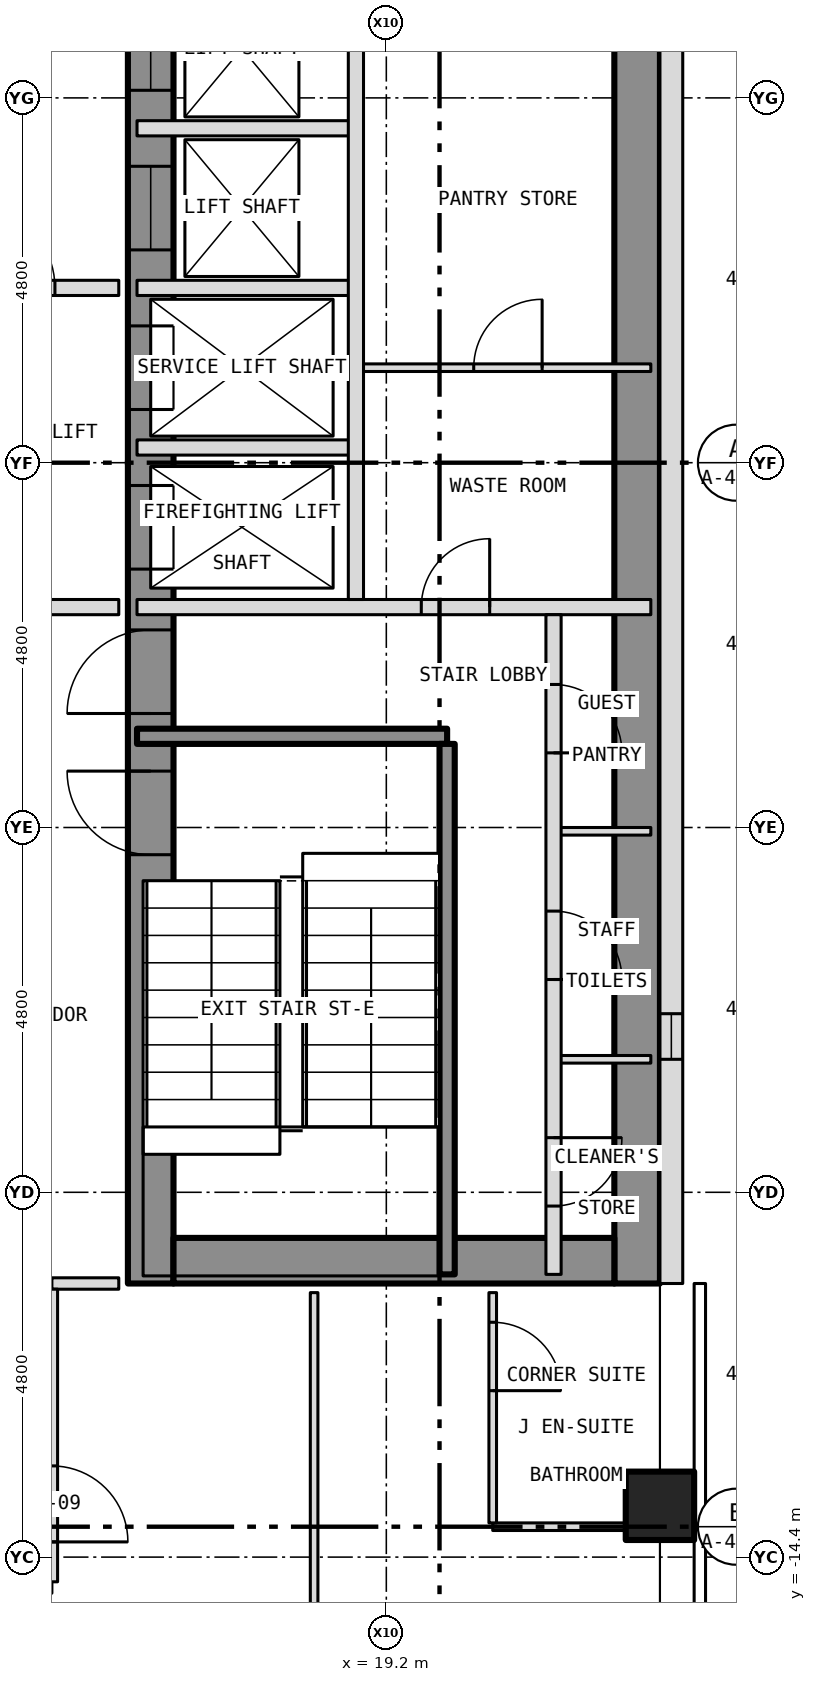
"""IFC4 building model, lengths in metres.
Left out: names, types, materials, properties, quantities, classifications, styles, units other than length and angle.
Written with IfcOpenShell. Run it as: python <this file> out.ifc"""

import sys

from ifc_helpers import new_model, si_unit, direction, frame, frame_2d, origin, origin_2d, place, context, subcontext, project, spatial, rectangle, hollow_rectangle, extrude, element, fill, save


model = new_model("IFC4")
c1 = context("Model", 3, precision=1e-05, world=origin(), true_north=direction((0.0, 1.0)))
c2 = subcontext(c1, "Body", "Model", "MODEL_VIEW")
j1 = project(units=[si_unit("LENGTHUNIT", "METRE"), si_unit("PLANEANGLEUNIT", "RADIAN")], contexts=[c1])
p1 = place(None, origin())
s1 = spatial("IfcSite", under=j1, at=p1, CompositionType="ELEMENT")
p2 = place(p1, origin())
s2 = spatial("IfcBuilding", under=s1, at=p2, CompositionType="ELEMENT")
p3 = place(p2, frame((0.0, 0.0, 110.0)))
s3 = spatial("IfcBuildingStorey", under=s2, at=p3, CompositionType="ELEMENT", Elevation=110.0)
p4 = place(p3, frame((22.8, -13.725, -0.15), z_axis=(0.0, 0.0, 1.0), x_axis=(1.0, 0.0, 0.0)))
e1 = element("IfcColumn", 1, at=p4, inside=s3, PredefinedType="COLUMN", context=c2, shape_type="SweptSolid", body=[
    extrude(hollow_rectangle(XDim=0.9, YDim=0.9, WallThickness=0.05, at=origin_2d()), origin(), (0.0, 0.0, 1.0), 3.5),
])
p5 = place(p3, frame((16.1, -10.8, 0.0), z_axis=(0.0, 0.0, 1.0), x_axis=(0.0, 1.0, 0.0)))
e2 = element("IfcWall", 2, at=p5, inside=s3, PredefinedType="SHEAR", context=c2, shape_type="SweptSolid", body=[
    extrude(rectangle(XDim=21.6, YDim=0.6, at=frame_2d((10.8, 0.0))), origin(), (0.0, 0.0, 1.0), 3.25),
])
p6 = place(p5, frame((9.4, 0.0, 0.0)))
e3 = element("IfcOpeningElement", 3, at=p6, cuts=e2, PredefinedType="OPENING", context=c2, shape_type="SweptSolid", body=[
    extrude(rectangle(XDim=1.1, YDim=2.1, at=frame_2d((0.55, 1.05))), frame((0.0, 0.312, 0.0), z_axis=(0.0, -1.0, 0.0), x_axis=(1.0, 0.0, 0.0)), (0.0, 0.0, 1.0), 0.624),
])
p7 = place(p5, frame((11.5, 0.0, 0.0)))
e4 = element("IfcOpeningElement", 4, at=p7, cuts=e2, PredefinedType="OPENING", context=c2, shape_type="SweptSolid", body=[
    extrude(rectangle(XDim=1.1, YDim=2.1, at=frame_2d((0.55, 1.05))), frame((0.0, 0.312, 0.0), z_axis=(0.0, -1.0, 0.0), x_axis=(1.0, 0.0, 0.0)), (0.0, 0.0, 1.0), 0.624),
])
p8 = place(p5, frame((13.6, 0.0, 0.0)))
e5 = element("IfcOpeningElement", 5, at=p8, cuts=e2, PredefinedType="OPENING", context=c2, shape_type="SweptSolid", body=[
    extrude(rectangle(XDim=1.1, YDim=2.1, at=frame_2d((0.55, 1.05))), frame((0.0, 0.312, 0.0), z_axis=(0.0, -1.0, 0.0), x_axis=(1.0, 0.0, 0.0)), (0.0, 0.0, 1.0), 0.624),
])
p9 = place(p5, frame((15.7, 0.0, 0.0)))
e6 = element("IfcOpeningElement", 6, at=p9, cuts=e2, PredefinedType="OPENING", context=c2, shape_type="SweptSolid", body=[
    extrude(rectangle(XDim=1.1, YDim=2.1, at=frame_2d((0.55, 1.05))), frame((0.0, 0.312, 0.0), z_axis=(0.0, -1.0, 0.0), x_axis=(1.0, 0.0, 0.0)), (0.0, 0.0, 1.0), 0.624),
])
p10 = place(p5, frame((17.8, 0.0, 0.0)))
e7 = element("IfcOpeningElement", 7, at=p10, cuts=e2, PredefinedType="OPENING", context=c2, shape_type="SweptSolid", body=[
    extrude(rectangle(XDim=1.1, YDim=2.1, at=frame_2d((0.55, 1.05))), frame((0.0, 0.312, 0.0), z_axis=(0.0, -1.0, 0.0), x_axis=(1.0, 0.0, 0.0)), (0.0, 0.0, 1.0), 0.624),
])
p11 = place(p5, frame((5.642, 0.0, 0.0)))
e8 = element("IfcOpeningElement", 8, at=p11, cuts=e2, PredefinedType="OPENING", context=c2, shape_type="SweptSolid", body=[
    extrude(rectangle(XDim=1.1, YDim=2.1, at=frame_2d((0.55, 1.05))), frame((0.0, 0.312, 0.0), z_axis=(0.0, -1.0, 0.0), x_axis=(1.0, 0.0, 0.0)), (0.0, 0.0, 1.0), 0.624),
])
p12 = place(p5, frame((7.5, 0.0, 0.0)))
e9 = element("IfcOpeningElement", 9, at=p12, cuts=e2, PredefinedType="OPENING", context=c2, shape_type="SweptSolid", body=[
    extrude(rectangle(XDim=1.1, YDim=2.1, at=frame_2d((0.55, 1.05))), frame((0.0, 0.312, 0.0), z_axis=(0.0, -1.0, 0.0), x_axis=(1.0, 0.0, 0.0)), (0.0, 0.0, 1.0), 0.624),
])
p13 = place(p3, frame((22.5, -10.8, 0.0), z_axis=(0.0, 0.0, 1.0), x_axis=(0.0, 1.0, 0.0)))
e10 = element("IfcWall", 10, at=p13, inside=s3, PredefinedType="SHEAR", context=c2, shape_type="SweptSolid", body=[
    extrude(rectangle(XDim=21.6, YDim=0.6, at=frame_2d((10.8, 0.0))), origin(), (0.0, 0.0, 1.0), 3.25),
])
p14 = place(p3, frame((16.4, -10.5, 0.0), z_axis=(0.0, 0.0, 1.0), x_axis=(1.0, 0.0, 0.0)))
e11 = element("IfcWall", 11, at=p14, inside=s3, PredefinedType="SHEAR", context=c2, shape_type="SweptSolid", body=[
    extrude(rectangle(XDim=5.8, YDim=0.6, at=frame_2d((2.9, 0.0))), origin(), (0.0, 0.0, 1.0), 3.25),
])
p15 = place(p3, frame((22.95, -10.8, 0.0), z_axis=(0.0, 0.0, 1.0), x_axis=(0.0, 1.0, 0.0)))
e12 = element("IfcWall", 12, at=p15, inside=s3, PredefinedType="SOLIDWALL", context=c2, shape_type="SweptSolid", body=[
    extrude(rectangle(XDim=21.6, YDim=0.3, at=frame_2d((10.8, 0.0))), origin(), (0.0, 0.0, 1.0), 3.5),
])
p16 = place(p15, frame((2.95, 0.0, 1.0)))
e13 = element("IfcOpeningElement", 13, at=p16, cuts=e12, PredefinedType="OPENING", context=c2, shape_type="SweptSolid", body=[
    extrude(rectangle(XDim=0.6, YDim=1.5, at=frame_2d((0.3, 0.75))), frame((0.0, 0.162, 0.0), z_axis=(0.0, -1.0, 0.0), x_axis=(1.0, 0.0, 0.0)), (0.0, 0.0, 1.0), 0.324),
])
p17 = place(p3, frame((20.6, -14.0, 0.0), z_axis=(0.0, 0.0, 1.0), x_axis=(1.0, 0.0, 0.0)))
e14 = element("IfcWall", 14, at=p17, inside=s3, PredefinedType="PARTITIONING", context=c2, shape_type="SweptSolid", body=[
    extrude(rectangle(XDim=2.08, YDim=0.1, at=frame_2d((1.04, 0.0))), origin(), (0.0, 0.0, 1.0), 3.35),
])
p18 = place(p3, frame((14.8, -10.8, 0.0), z_axis=(0.0, 0.0, 1.0), x_axis=(1.0, 0.0, 0.0)))
e15 = element("IfcWall", 15, at=p18, inside=s3, PredefinedType="PARTITIONING", context=c2, shape_type="SweptSolid", body=[
    extrude(rectangle(XDim=0.88, YDim=0.15, at=frame_2d((0.44, 0.0))), origin(), (0.0, 0.0, 1.0), 3.35),
])
for number, where, z_axis, x_axis in (
    (16, (21.4, -7.85, 0.0), (0.0, 0.0, 1.0), (1.0, 0.0, 0.0)),
    (17, (21.4, -4.85, 0.0), (0.0, 0.0, 1.0), (1.0, 0.0, 0.0)),
):
    element("IfcWall", number, at=place(p3, frame(where, z_axis=z_axis, x_axis=x_axis)), inside=s3, PredefinedType="PARTITIONING", context=c2, shape_type="SweptSolid", body=[
        extrude(rectangle(XDim=1.28, YDim=0.1, at=frame_2d((0.64, 0.0))), origin(), (0.0, 0.0, 1.0), 3.25),
    ])
p19 = place(p3, frame((15.92, -3.6, 0.0), z_axis=(0.0, 0.0, 1.0), x_axis=(1.0, 0.0, 0.0)))
e18 = element("IfcWall", 18, at=p19, inside=s3, PredefinedType="SHEAR", context=c2, shape_type="SweptSolid", body=[
    extrude(rectangle(XDim=4.08, YDim=0.2, at=frame_2d((2.04, 0.0))), origin(), (0.0, 0.0, 1.0), 3.25),
])
p20 = place(p3, frame((12.4, -1.9, 0.0), z_axis=(0.0, 0.0, 1.0), x_axis=(1.0, 0.0, 0.0)))
e19 = element("IfcWall", 19, at=p20, inside=s3, PredefinedType="PARTITIONING", context=c2, shape_type="SweptSolid", body=[
    extrude(rectangle(XDim=3.28, YDim=0.2, at=frame_2d((1.64, 0.0))), origin(), (0.0, 0.0, 1.0), 3.35),
])
p21 = place(p20, frame((1.24, 0.0, 0.0)))
e20 = element("IfcOpeningElement", 20, at=p21, cuts=e19, PredefinedType="OPENING", context=c2, shape_type="SweptSolid", body=[
    extrude(rectangle(XDim=1.1, YDim=2.1, at=frame_2d((0.55, 1.05))), frame((0.0, 0.112, 0.0), z_axis=(0.0, -1.0, 0.0), x_axis=(1.0, 0.0, 0.0)), (0.0, 0.0, 1.0), 0.224),
])
p22 = place(p3, frame((15.92, -1.9, 0.0), z_axis=(0.0, 0.0, 1.0), x_axis=(1.0, 0.0, 0.0)))
e21 = element("IfcWall", 21, at=p22, inside=s3, PredefinedType="PARTITIONING", context=c2, shape_type="SweptSolid", body=[
    extrude(rectangle(XDim=6.76, YDim=0.2, at=frame_2d((3.38, 0.0))), origin(), (0.0, 0.0, 1.0), 3.25),
])
p23 = place(p22, frame((3.74, 0.0, 0.0)))
e22 = element("IfcOpeningElement", 22, at=p23, cuts=e21, PredefinedType="OPENING", context=c2, shape_type="SweptSolid", body=[
    extrude(rectangle(XDim=0.9, YDim=2.1, at=frame_2d((0.45, 1.05))), frame((0.0, 0.112, 0.0), z_axis=(0.0, -1.0, 0.0), x_axis=(1.0, 0.0, 0.0)), (0.0, 0.0, 1.0), 0.224),
])
p24 = place(p3, frame((15.92, 0.2, 0.0), z_axis=(0.0, 0.0, 1.0), x_axis=(1.0, 0.0, 0.0)))
e23 = element("IfcWall", 23, at=p24, inside=s3, PredefinedType="PARTITIONING", context=c2, shape_type="SweptSolid", body=[
    extrude(rectangle(XDim=2.88, YDim=0.2, at=frame_2d((1.44, 0.0))), origin(), (0.0, 0.0, 1.0), 3.25),
])
p25 = place(p3, frame((18.8, 1.25, 0.0), z_axis=(0.0, 0.0, 1.0), x_axis=(1.0, 0.0, 0.0)))
e24 = element("IfcWall", 24, at=p25, inside=s3, PredefinedType="PARTITIONING", context=c2, shape_type="SweptSolid", body=[
    extrude(rectangle(XDim=3.88, YDim=0.1, at=frame_2d((1.94, 0.0))), origin(), (0.0, 0.0, 1.0), 3.25),
])
p26 = place(p25, frame((1.55, 0.0, 0.0)))
e25 = element("IfcOpeningElement", 25, at=p26, cuts=e24, PredefinedType="OPENING", context=c2, shape_type="SweptSolid", body=[
    extrude(rectangle(XDim=0.9, YDim=2.1, at=frame_2d((0.45, 1.05))), frame((0.0, 0.062, 0.0), z_axis=(0.0, -1.0, 0.0), x_axis=(1.0, 0.0, 0.0)), (0.0, 0.0, 1.0), 0.124),
])
p27 = place(p3, frame((12.4, 2.3, 0.0), z_axis=(0.0, 0.0, 1.0), x_axis=(1.0, 0.0, 0.0)))
e26 = element("IfcWall", 26, at=p27, inside=s3, PredefinedType="PARTITIONING", context=c2, shape_type="SweptSolid", body=[
    extrude(rectangle(XDim=3.28, YDim=0.2, at=frame_2d((1.64, 0.0))), origin(), (0.0, 0.0, 1.0), 3.35),
])
p28 = place(p27, frame((1.34, 0.0, 0.0)))
e27 = element("IfcOpeningElement", 27, at=p28, cuts=e26, PredefinedType="OPENING", context=c2, shape_type="SweptSolid", body=[
    extrude(rectangle(XDim=1.1, YDim=2.1, at=frame_2d((0.55, 1.05))), frame((0.0, 0.112, 0.0), z_axis=(0.0, -1.0, 0.0), x_axis=(1.0, 0.0, 0.0)), (0.0, 0.0, 1.0), 0.224),
])
for number, where, z_axis, x_axis in (
    (28, (15.92, 2.3, 0.0), (0.0, 0.0, 1.0), (1.0, 0.0, 0.0)),
    (29, (15.92, 4.4, 0.0), (0.0, 0.0, 1.0), (1.0, 0.0, 0.0)),
):
    element("IfcWall", number, at=place(p3, frame(where, z_axis=z_axis, x_axis=x_axis)), inside=s3, PredefinedType="PARTITIONING", context=c2, shape_type="SweptSolid", body=[
        extrude(rectangle(XDim=2.88, YDim=0.2, at=frame_2d((1.44, 0.0))), origin(), (0.0, 0.0, 1.0), 3.25),
    ])
p29 = place(p3, frame((14.8, -14.725, 0.0), z_axis=(0.0, 0.0, 1.0), x_axis=(0.0, 1.0, 0.0)))
e30 = element("IfcWall", 30, at=p29, inside=s3, PredefinedType="PARTITIONING", context=c2, shape_type="SweptSolid", body=[
    extrude(rectangle(XDim=3.85, YDim=0.15, at=frame_2d((1.925, 0.0))), origin(), (0.0, 0.0, 1.0), 3.35),
])
p30 = place(p29, frame((0.525, 0.0, 0.0)))
e31 = element("IfcOpeningElement", 31, at=p30, cuts=e30, PredefinedType="OPENING", context=c2, shape_type="SweptSolid", body=[
    extrude(rectangle(XDim=1.0, YDim=2.1, at=frame_2d((0.5, 1.05))), frame((0.0, 0.087, 0.0), z_axis=(0.0, -1.0, 0.0), x_axis=(1.0, 0.0, 0.0)), (0.0, 0.0, 1.0), 0.174),
])
p31 = place(p3, frame((18.25, -18.191, 0.0), z_axis=(0.0, 0.0, 1.0), x_axis=(0.0, 1.0, 0.0)))
e32 = element("IfcWall", 32, at=p31, inside=s3, PredefinedType="PARTITIONING", context=c2, shape_type="SweptSolid", body=[
    extrude(rectangle(XDim=7.271, YDim=0.1, at=frame_2d((3.635, 0.0))), origin(), (0.0, 0.0, 1.0), 3.35),
])
p32 = place(p31, frame((0.941, 0.0, 0.0)))
e33 = element("IfcOpeningElement", 33, at=p32, cuts=e32, PredefinedType="OPENING", context=c2, shape_type="SweptSolid", body=[
    extrude(rectangle(XDim=0.9, YDim=2.1, at=frame_2d((0.45, 1.05))), frame((0.0, 0.062, 0.0), z_axis=(0.0, -1.0, 0.0), x_axis=(1.0, 0.0, 0.0)), (0.0, 0.0, 1.0), 0.124),
])
p33 = place(p3, frame((18.8, -1.8, 0.0), z_axis=(0.0, 0.0, 1.0), x_axis=(0.0, 1.0, 0.0)))
e34 = element("IfcWall", 34, at=p33, inside=s3, PredefinedType="PARTITIONING", context=c2, shape_type="SweptSolid", body=[
    extrude(rectangle(XDim=12.48, YDim=0.2, at=frame_2d((6.24, 0.0))), origin(), (0.0, 0.0, 1.0), 3.25),
])
p34 = place(p3, frame((20.0, -10.68, 0.0), z_axis=(0.0, 0.0, 1.0), x_axis=(0.0, 1.0, 0.0)))
e35 = element("IfcWall", 35, at=p34, inside=s3, PredefinedType="SHEAR", context=c2, shape_type="SweptSolid", body=[
    extrude(rectangle(XDim=6.98, YDim=0.2, at=frame_2d((3.49, 0.0))), origin(), (0.0, 0.0, 1.0), 3.25),
])
p35 = place(p3, frame((20.6, -13.95, 0.0), z_axis=(0.0, 0.0, 1.0), x_axis=(0.0, 1.0, 0.0)))
e36 = element("IfcWall", 36, at=p35, inside=s3, PredefinedType="PARTITIONING", context=c2, shape_type="SweptSolid", body=[
    extrude(rectangle(XDim=3.03, YDim=0.1, at=frame_2d((1.515, 0.0))), origin(), (0.0, 0.0, 1.0), 3.35),
])
p36 = place(p35, frame((1.74, 0.0, 0.0)))
e37 = element("IfcOpeningElement", 37, at=p36, cuts=e36, PredefinedType="OPENING", context=c2, shape_type="SweptSolid", body=[
    extrude(rectangle(XDim=0.9, YDim=2.1, at=frame_2d((0.45, 1.05))), frame((0.0, 0.062, 0.0), z_axis=(0.0, -1.0, 0.0), x_axis=(1.0, 0.0, 0.0)), (0.0, 0.0, 1.0), 0.124),
])
p37 = place(p3, frame((21.4, -10.68, 0.0), z_axis=(0.0, 0.0, 1.0), x_axis=(0.0, 1.0, 0.0)))
e38 = element("IfcWall", 38, at=p37, inside=s3, PredefinedType="PARTITIONING", context=c2, shape_type="SweptSolid", body=[
    extrude(rectangle(XDim=8.68, YDim=0.2, at=frame_2d((4.34, 0.0))), origin(), (0.0, 0.0, 1.0), 3.25),
])
p38 = place(p37, frame((0.899, 0.0, 0.0)))
e39 = element("IfcOpeningElement", 39, at=p38, cuts=e38, PredefinedType="OPENING", context=c2, shape_type="SweptSolid", body=[
    extrude(rectangle(XDim=0.9, YDim=2.1, at=frame_2d((0.45, 1.05))), frame((0.0, 0.112, 0.0), z_axis=(0.0, -1.0, 0.0), x_axis=(1.0, 0.0, 0.0)), (0.0, 0.0, 1.0), 0.224),
])
p39 = place(p37, frame((3.88, 0.0, 0.0)))
e40 = element("IfcOpeningElement", 40, at=p39, cuts=e38, PredefinedType="OPENING", context=c2, shape_type="SweptSolid", body=[
    extrude(rectangle(XDim=0.9, YDim=2.1, at=frame_2d((0.45, 1.05))), frame((0.0, 0.112, 0.0), z_axis=(0.0, -1.0, 0.0), x_axis=(1.0, 0.0, 0.0)), (0.0, 0.0, 1.0), 0.224),
])
p40 = place(p37, frame((6.862, 0.0, 0.0)))
e41 = element("IfcOpeningElement", 41, at=p40, cuts=e38, PredefinedType="OPENING", context=c2, shape_type="SweptSolid", body=[
    extrude(rectangle(XDim=0.9, YDim=2.1, at=frame_2d((0.45, 1.05))), frame((0.0, 0.112, 0.0), z_axis=(0.0, -1.0, 0.0), x_axis=(1.0, 0.0, 0.0)), (0.0, 0.0, 1.0), 0.224),
])
p41 = place(p16, origin())
e42 = element("IfcWindow", 42, at=p41, inside=s3, PartitioningType="SINGLE_PANEL", PredefinedType="WINDOW", context=c2, shape_type="SweptSolid", body=[
    extrude(rectangle(XDim=0.6, YDim=1.5, at=frame_2d((0.3, 0.75))), frame((0.0, -0.06, 0.0), z_axis=(0.0, -1.0, 0.0), x_axis=(1.0, 0.0, 0.0)), (0.0, 0.0, 1.0), 0.06),
])
fill(e13, e42)
p42 = place(p6, origin())
e43 = element("IfcDoor", 43, at=p42, inside=s3, OperationType="SLIDING_TO_LEFT", PredefinedType="DOOR", context=c2, shape_type="SweptSolid", body=[
    extrude(rectangle(XDim=1.1, YDim=2.1, at=frame_2d((0.55, 1.05))), frame((0.0, 0.025, 0.0), z_axis=(0.0, -1.0, 0.0), x_axis=(1.0, 0.0, 0.0)), (0.0, 0.0, 1.0), 0.05),
])
fill(e3, e43)
p43 = place(p7, origin())
e44 = element("IfcDoor", 44, at=p43, inside=s3, OperationType="SLIDING_TO_LEFT", PredefinedType="DOOR", context=c2, shape_type="SweptSolid", body=[
    extrude(rectangle(XDim=1.1, YDim=2.1, at=frame_2d((0.55, 1.05))), frame((0.0, 0.025, 0.0), z_axis=(0.0, -1.0, 0.0), x_axis=(1.0, 0.0, 0.0)), (0.0, 0.0, 1.0), 0.05),
])
fill(e4, e44)
p44 = place(p8, origin())
e45 = element("IfcDoor", 45, at=p44, inside=s3, OperationType="SLIDING_TO_LEFT", PredefinedType="DOOR", context=c2, shape_type="SweptSolid", body=[
    extrude(rectangle(XDim=1.1, YDim=2.1, at=frame_2d((0.55, 1.05))), frame((0.0, 0.025, 0.0), z_axis=(0.0, -1.0, 0.0), x_axis=(1.0, 0.0, 0.0)), (0.0, 0.0, 1.0), 0.05),
])
fill(e5, e45)
p45 = place(p9, origin())
e46 = element("IfcDoor", 46, at=p45, inside=s3, OperationType="SLIDING_TO_LEFT", PredefinedType="DOOR", context=c2, shape_type="SweptSolid", body=[
    extrude(rectangle(XDim=1.1, YDim=2.1, at=frame_2d((0.55, 1.05))), frame((0.0, 0.025, 0.0), z_axis=(0.0, -1.0, 0.0), x_axis=(1.0, 0.0, 0.0)), (0.0, 0.0, 1.0), 0.05),
])
fill(e6, e46)
p46 = place(p11, origin())
e47 = element("IfcDoor", 47, at=p46, inside=s3, OperationType="SINGLE_SWING_RIGHT", PredefinedType="DOOR", context=c2, shape_type="SweptSolid", body=[
    extrude(rectangle(XDim=1.1, YDim=2.1, at=frame_2d((0.55, 1.05))), frame((0.0, 0.025, 0.0), z_axis=(0.0, -1.0, 0.0), x_axis=(1.0, 0.0, 0.0)), (0.0, 0.0, 1.0), 0.05),
])
fill(e8, e47)
p47 = place(p12, origin())
e48 = element("IfcDoor", 48, at=p47, inside=s3, OperationType="SINGLE_SWING_LEFT", PredefinedType="DOOR", context=c2, shape_type="SweptSolid", body=[
    extrude(rectangle(XDim=1.1, YDim=2.1, at=frame_2d((0.55, 1.05))), frame((0.0, 0.025, 0.0), z_axis=(0.0, -1.0, 0.0), x_axis=(1.0, 0.0, 0.0)), (0.0, 0.0, 1.0), 0.05),
])
fill(e9, e48)
p48 = place(p38, origin())
e49 = element("IfcDoor", 49, at=p48, inside=s3, OperationType="SINGLE_SWING_RIGHT", PredefinedType="DOOR", context=c2, shape_type="SweptSolid", body=[
    extrude(rectangle(XDim=0.9, YDim=2.1, at=frame_2d((0.45, 1.05))), frame((0.0, 0.025, 0.0), z_axis=(0.0, -1.0, 0.0), x_axis=(1.0, 0.0, 0.0)), (0.0, 0.0, 1.0), 0.05),
])
fill(e39, e49)
p49 = place(p39, origin())
e50 = element("IfcDoor", 50, at=p49, inside=s3, OperationType="SINGLE_SWING_LEFT", PredefinedType="DOOR", context=c2, shape_type="SweptSolid", body=[
    extrude(rectangle(XDim=0.9, YDim=2.1, at=frame_2d((0.45, 1.05))), frame((0.0, 0.025, 0.0), z_axis=(0.0, -1.0, 0.0), x_axis=(1.0, 0.0, 0.0)), (0.0, 0.0, 1.0), 0.05),
])
fill(e40, e50)
p50 = place(p40, origin())
e51 = element("IfcDoor", 51, at=p50, inside=s3, OperationType="SINGLE_SWING_LEFT", PredefinedType="DOOR", context=c2, shape_type="SweptSolid", body=[
    extrude(rectangle(XDim=0.9, YDim=2.1, at=frame_2d((0.45, 1.05))), frame((0.0, 0.025, 0.0), z_axis=(0.0, -1.0, 0.0), x_axis=(1.0, 0.0, 0.0)), (0.0, 0.0, 1.0), 0.05),
])
fill(e41, e51)
p51 = place(p23, origin())
e52 = element("IfcDoor", 52, at=p51, inside=s3, OperationType="SINGLE_SWING_RIGHT", PredefinedType="DOOR", context=c2, shape_type="SweptSolid", body=[
    extrude(rectangle(XDim=0.9, YDim=2.1, at=frame_2d((0.45, 1.05))), frame((0.0, 0.025, 0.0), z_axis=(0.0, -1.0, 0.0), x_axis=(1.0, 0.0, 0.0)), (0.0, 0.0, 1.0), 0.05),
])
fill(e22, e52)
p52 = place(p26, origin())
e53 = element("IfcDoor", 53, at=p52, inside=s3, OperationType="SINGLE_SWING_RIGHT", PredefinedType="DOOR", context=c2, shape_type="SweptSolid", body=[
    extrude(rectangle(XDim=0.9, YDim=2.1, at=frame_2d((0.45, 1.05))), frame((0.0, 0.025, 0.0), z_axis=(0.0, -1.0, 0.0), x_axis=(1.0, 0.0, 0.0)), (0.0, 0.0, 1.0), 0.05),
])
fill(e25, e53)
p53 = place(p28, origin())
e54 = element("IfcDoor", 54, at=p53, inside=s3, OperationType="SINGLE_SWING_LEFT", PredefinedType="DOOR", context=c2, shape_type="SweptSolid", body=[
    extrude(rectangle(XDim=1.1, YDim=2.1, at=frame_2d((0.55, 1.05))), frame((0.0, 0.025, 0.0), z_axis=(0.0, -1.0, 0.0), x_axis=(1.0, 0.0, 0.0)), (0.0, 0.0, 1.0), 0.05),
])
fill(e27, e54)
p54 = place(p30, origin())
e55 = element("IfcDoor", 55, at=p54, inside=s3, OperationType="SINGLE_SWING_LEFT", PredefinedType="DOOR", context=c2, shape_type="SweptSolid", body=[
    extrude(rectangle(XDim=1.0, YDim=2.1, at=frame_2d((0.5, 1.05))), frame((0.0, 0.025, 0.0), z_axis=(0.0, -1.0, 0.0), x_axis=(1.0, 0.0, 0.0)), (0.0, 0.0, 1.0), 0.05),
])
fill(e31, e55)
p55 = place(p36, origin())
e56 = element("IfcDoor", 56, at=p55, inside=s3, OperationType="SINGLE_SWING_LEFT", PredefinedType="DOOR", context=c2, shape_type="SweptSolid", body=[
    extrude(rectangle(XDim=0.9, YDim=2.1, at=frame_2d((0.45, 1.05))), frame((0.0, 0.025, 0.0), z_axis=(0.0, -1.0, 0.0), x_axis=(1.0, 0.0, 0.0)), (0.0, 0.0, 1.0), 0.05),
])
fill(e37, e56)
save(model, sys.argv[1])
